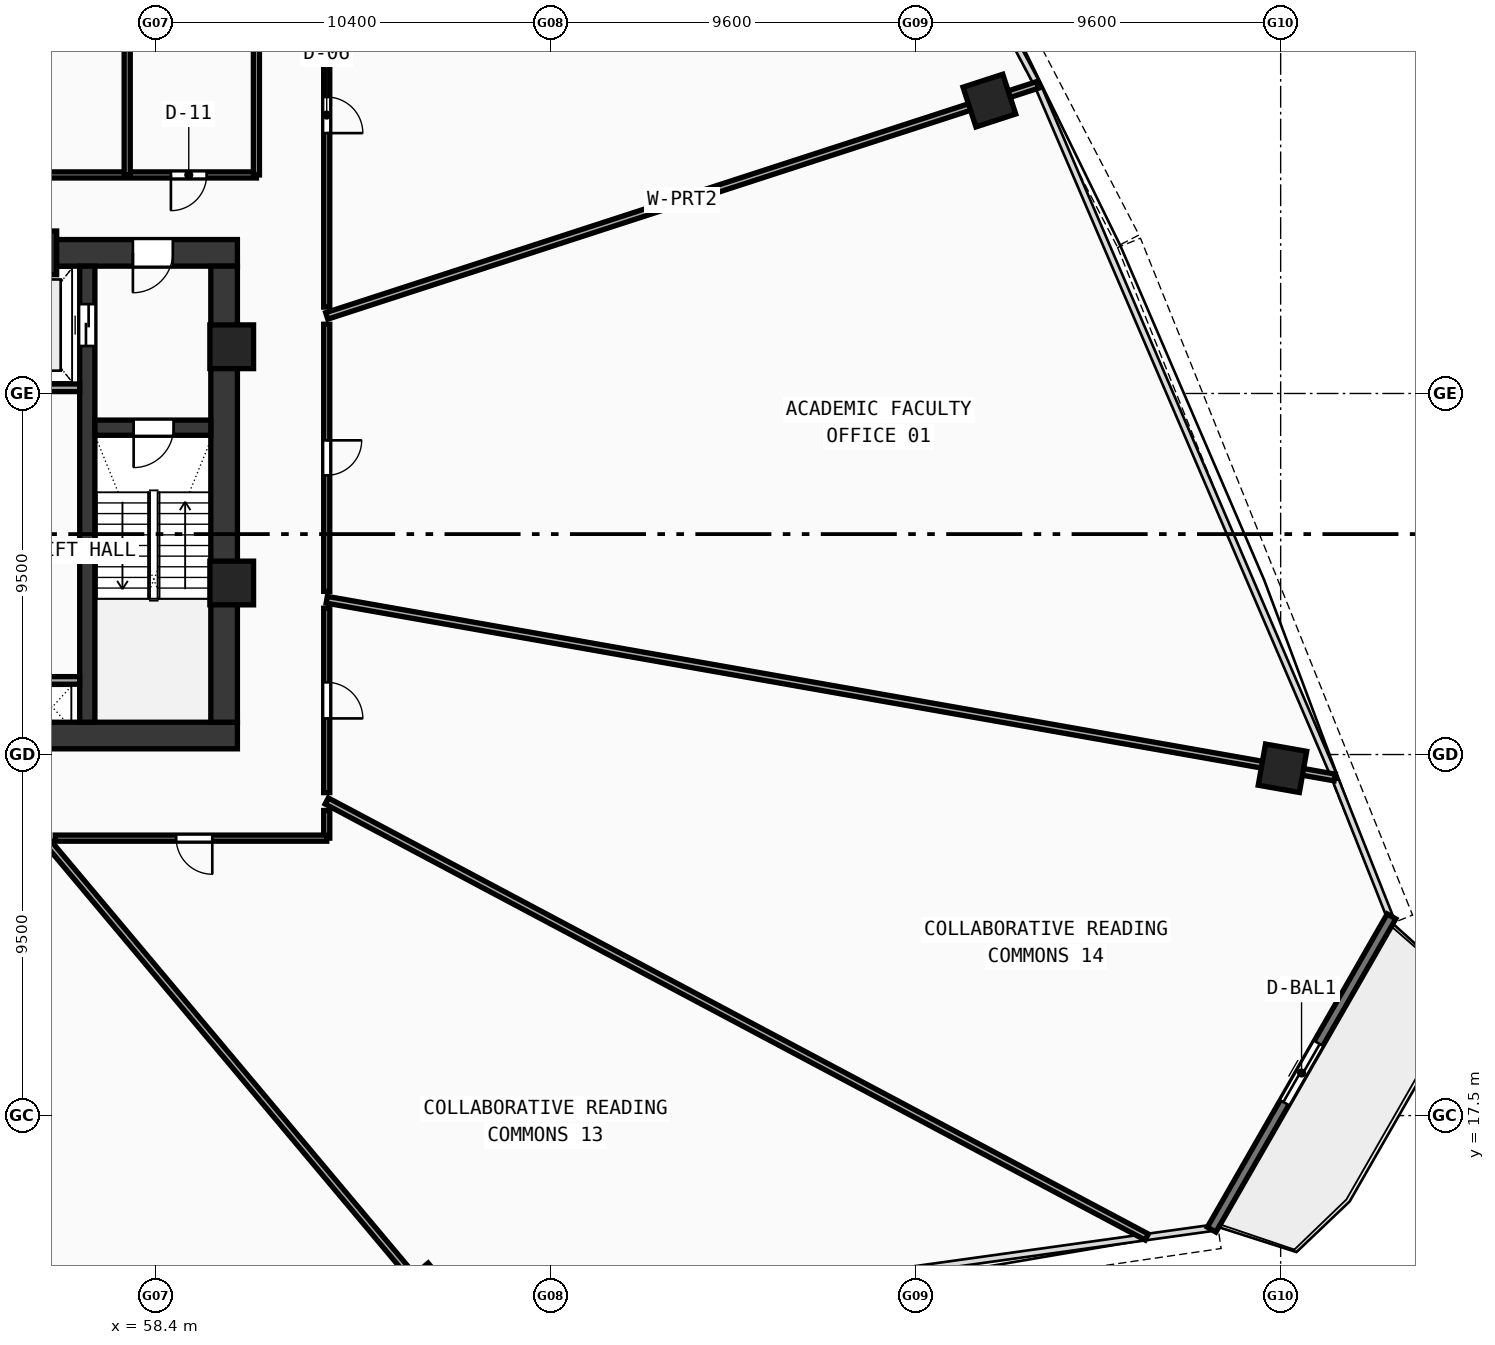
"""IFC4 building model, lengths in metres.
Left out: names, types, materials, properties, quantities, classifications, styles, units other than length and angle.
Written with IfcOpenShell. Run it as: python <this file> out.ifc"""

import sys

from ifc_helpers import new_model, si_unit, direction, frame, frame_2d, origin, origin_with_axes, origin_2d, place, context, subcontext, project, spatial, rectangle, hollow_rectangle, extrude, source, transform, mapped, element, fill, save


model = new_model("IFC4")
c1 = context("Model", 3, precision=1e-05, world=origin(), true_north=direction((0.0, 1.0)))
c2 = subcontext(c1, "Body", "Model", "MODEL_VIEW")
j1 = project(units=[si_unit("LENGTHUNIT", "METRE"), si_unit("PLANEANGLEUNIT", "RADIAN")], contexts=[c1])
p1 = place(None, origin())
s1 = spatial("IfcSite", under=j1, at=p1, CompositionType="ELEMENT")
p2 = place(p1, origin())
s2 = spatial("IfcBuilding", under=s1, at=p2, CompositionType="ELEMENT")
p3 = place(p2, frame((0.0, 0.0, 55.81)))
s3 = spatial("IfcBuildingStorey", under=s2, at=p3, CompositionType="ELEMENT", Elevation=55.81)
p4 = place(p3, frame((35.45, 27.5, 0.0), z_axis=(0.0, 0.0, 1.0), x_axis=(1.0, 0.0, 0.0)))
e1 = element("IfcWall", 1, at=p4, inside=s3, PredefinedType="SHEAR", context=c2, shape_type="SweptSolid", body=[
    extrude(rectangle(XDim=25.1, YDim=0.7, at=frame_2d((12.55, 0.0))), origin(), (0.0, 0.0, 1.0), 3.37),
])
p5 = place(p3, frame((49.2, 40.2, 0.0), z_axis=(0.0, 0.0, 1.0), x_axis=(1.0, 0.0, 0.0)))
e2 = element("IfcWall", 2, at=p5, inside=s3, PredefinedType="SHEAR", context=c2, shape_type="SweptSolid", body=[
    extrude(rectangle(XDim=11.35, YDim=0.7, at=frame_2d((5.675, 0.0))), origin(), (0.0, 0.0, 1.0), 3.37),
])
p6 = place(p5, frame((8.6, 0.0, 0.0)))
e3 = element("IfcOpeningElement", 3, at=p6, cuts=e2, PredefinedType="OPENING", context=c2, shape_type="SweptSolid", body=[
    extrude(rectangle(XDim=1.05, YDim=2.1, at=frame_2d((0.525, 1.05))), frame((0.0, 0.36, 0.0), z_axis=(0.0, -1.0, 0.0), x_axis=(1.0, 0.0, 0.0)), (0.0, 0.0, 1.0), 0.72),
])
p7 = place(p3, frame((60.2, 27.85, 0.0), z_axis=(0.0, 0.0, 1.0), x_axis=(0.0, 1.0, 0.0)))
e4 = element("IfcWall", 4, at=p7, inside=s3, PredefinedType="SHEAR", context=c2, shape_type="SweptSolid", body=[
    extrude(rectangle(XDim=12.0, YDim=0.7, at=frame_2d((6.0, 0.0))), origin(), (0.0, 0.0, 1.0), 3.37),
])
p8 = place(p3, frame((56.6, 27.85, 0.0), z_axis=(0.0, 0.0, 1.0), x_axis=(0.0, 1.0, 0.0)))
e5 = element("IfcWall", 5, at=p8, inside=s3, PredefinedType="SHEAR", context=c2, shape_type="SweptSolid", body=[
    extrude(rectangle(XDim=12.0, YDim=0.4, at=frame_2d((6.0, 0.0))), origin(), (0.0, 0.0, 1.0), 3.37),
])
p9 = place(p8, frame((9.9, 0.0, 0.0)))
e6 = element("IfcOpeningElement", 6, at=p9, cuts=e5, PredefinedType="OPENING", context=c2, shape_type="SweptSolid", body=[
    extrude(rectangle(XDim=1.1, YDim=2.1, at=frame_2d((0.55, 1.05))), frame((0.0, 0.21, 0.0), z_axis=(0.0, -1.0, 0.0), x_axis=(1.0, 0.0, 0.0)), (0.0, 0.0, 1.0), 0.42),
])
p10 = place(p3, frame((56.8, 35.6, 0.0), z_axis=(0.0, 0.0, 1.0), x_axis=(1.0, 0.0, 0.0)))
e7 = element("IfcWall", 7, at=p10, inside=s3, PredefinedType="SHEAR", context=c2, shape_type="SweptSolid", body=[
    extrude(rectangle(XDim=3.05, YDim=0.4, at=frame_2d((1.525, 0.0))), origin(), (0.0, 0.0, 1.0), 3.37),
])
p11 = place(p10, frame((1.02, 0.0, 0.0)))
e8 = element("IfcOpeningElement", 8, at=p11, cuts=e7, PredefinedType="OPENING", context=c2, shape_type="SweptSolid", body=[
    extrude(rectangle(XDim=1.05, YDim=2.1, at=frame_2d((0.525, 1.05))), frame((0.0, 0.21, 0.0), z_axis=(0.0, -1.0, 0.0), x_axis=(1.0, 0.0, 0.0)), (0.0, 0.0, 1.0), 0.42),
])
m1 = source(origin(), c2, "Body", "SweptSolid", [
    extrude(hollow_rectangle(XDim=1.15, YDim=1.15, WallThickness=0.048, at=origin_2d()), origin(), (0.0, 0.0, 1.0), 3.63),
])
for number, where, z_axis, x_axis in (
    (9, (60.4, 31.513, -0.26), (0.0, 0.0, 1.0), (1.0, 0.0, 0.0)),
    (10, (60.4, 37.729, -0.26), (0.0, 0.0, 1.0), (1.0, 0.0, 0.0)),
    (11, (55.219, 40.2, -0.26), (0.0, 0.0, 1.0), (1.0, 0.0, 0.0)),
):
    element("IfcColumn", number, at=place(p3, frame(where, z_axis=z_axis, x_axis=x_axis)), inside=s3, PredefinedType="COLUMN", context=c2, shape_type="MappedRepresentation", body=[
        mapped(m1, transform((0.0, 0.0, 0.0), scale=1.0)),
    ])
m2 = source(origin(), c2, "Body", "SweptSolid", [
    extrude(hollow_rectangle(XDim=1.1, YDim=1.1, WallThickness=0.045, at=origin_2d()), origin(), (0.0, 0.0, 1.0), 3.63),
])
for number, where, z_axis, x_axis in (
    (12, (65.5, 12.844, -0.26), (0.0, 0.0, 1.0), (0.766, 0.643, 0.0)),
    (13, (88.048, 26.638, -0.26), (0.0, 0.0, 1.0), (0.174, 0.985, 0.0)),
    (14, (80.335, 44.206, -0.26), (0.0, 0.0, 1.0), (-0.309, 0.951, 0.0)),
):
    element("IfcColumn", number, at=place(p3, frame(where, z_axis=z_axis, x_axis=x_axis)), inside=s3, PredefinedType="COLUMN", context=c2, shape_type="MappedRepresentation", body=[
        mapped(m2, transform((0.0, 0.0, 0.0), scale=1.0)),
    ])
p12 = place(p3, frame((86.184, 14.499, 0.0), z_axis=(0.0, 0.0, 1.0), x_axis=(0.497919395469, 0.86722331358, 0.0)))
e15 = element("IfcWall", 15, at=p12, inside=s3, PredefinedType="STANDARD", context=c2, shape_type="SweptSolid", body=[
    extrude(rectangle(XDim=9.504, YDim=0.26, at=frame_2d((4.752, 0.0))), origin(), (0.0, 0.0, 1.0), 3.37),
])
p13 = place(p12, frame((3.852, 0.0, 0.0)))
e16 = element("IfcOpeningElement", 16, at=p13, cuts=e15, PredefinedType="OPENING", context=c2, shape_type="SweptSolid", body=[
    extrude(rectangle(XDim=1.8, YDim=2.15, at=frame_2d((0.9, 1.075))), frame((0.0, 0.14, 0.0), z_axis=(0.0, -1.0, 0.0), x_axis=(1.0, 0.0, 0.0)), (0.0, 0.0, 1.0), 0.28),
])
p14 = place(p3, frame((53.68, 36.65, 0.0), z_axis=(0.0, 0.0, 1.0), x_axis=(1.0, 0.0, 0.0)))
e17 = element("IfcWall", 17, at=p14, inside=s3, PredefinedType="SOLIDWALL", context=c2, shape_type="SweptSolid", body=[
    extrude(rectangle(XDim=2.72, YDim=0.2, at=frame_2d((1.36, 0.0))), origin(), (0.0, 0.0, 1.0), 3.37),
])
p15 = place(p3, frame((55.12, 28.95, 0.0), z_axis=(0.0, 0.0, 1.0), x_axis=(1.0, 0.0, 0.0)))
e18 = element("IfcWall", 18, at=p15, inside=s3, PredefinedType="SOLIDWALL", context=c2, shape_type="SweptSolid", body=[
    extrude(rectangle(XDim=1.28, YDim=0.2, at=frame_2d((0.64, 0.0))), origin(), (0.0, 0.0, 1.0), 3.37),
])
p16 = place(p3, frame((45.92, 42.25, 0.0), z_axis=(0.0, 0.0, 1.0), x_axis=(1.0, 0.0, 0.0)))
e19 = element("IfcWall", 19, at=p16, inside=s3, PredefinedType="PARTITIONING", context=c2, shape_type="SweptSolid", body=[
    extrude(rectangle(XDim=15.13, YDim=0.16, at=frame_2d((7.565, 0.0))), origin(), (0.0, 0.0, 1.0), 2.67),
])
p17 = place(p16, frame((2.1, 0.0, 0.0)))
e20 = element("IfcOpeningElement", 20, at=p17, cuts=e19, PredefinedType="OPENING", context=c2, shape_type="SweptSolid", body=[
    extrude(rectangle(XDim=0.92, YDim=2.1, at=frame_2d((0.46, 1.05))), frame((0.0, 0.09, 0.0), z_axis=(0.0, -1.0, 0.0), x_axis=(1.0, 0.0, 0.0)), (0.0, 0.0, 1.0), 0.18),
])
p18 = place(p16, frame((12.88, 0.0, 0.0)))
e21 = element("IfcOpeningElement", 21, at=p18, cuts=e19, PredefinedType="OPENING", context=c2, shape_type="SweptSolid", body=[
    extrude(rectangle(XDim=0.94, YDim=2.1, at=frame_2d((0.47, 1.05))), frame((0.0, 0.09, 0.0), z_axis=(0.0, -1.0, 0.0), x_axis=(1.0, 0.0, 0.0)), (0.0, 0.0, 1.0), 0.18),
])
p19 = place(p3, frame((61.05, 42.25, 0.0), z_axis=(0.0, 0.0, 1.0), x_axis=(0.0, 1.0, 0.0)))
e22 = element("IfcWall", 22, at=p19, inside=s3, PredefinedType="PARTITIONING", context=c2, shape_type="SweptSolid", body=[
    extrude(rectangle(XDim=4.55, YDim=0.16, at=frame_2d((2.275, 0.0))), origin(), (0.0, 0.0, 1.0), 2.67),
])
p20 = place(p3, frame((57.65, 42.25, 0.0), z_axis=(0.0, 0.0, 1.0), x_axis=(0.0, 1.0, 0.0)))
e23 = element("IfcWall", 23, at=p20, inside=s3, PredefinedType="PARTITIONING", context=c2, shape_type="SweptSolid", body=[
    extrude(rectangle(XDim=4.35, YDim=0.16, at=frame_2d((2.175, 0.0))), origin(), (0.0, 0.0, 1.0), 2.67),
])
p21 = place(p3, frame((62.9, 38.541, 0.0), z_axis=(0.0, 0.0, 1.0), x_axis=(0.951053317048, 0.309026840471, 0.0)))
e24 = element("IfcWall", 24, at=p21, inside=s3, PredefinedType="PARTITIONING", context=c2, shape_type="SweptSolid", body=[
    extrude(rectangle(XDim=19.666, YDim=0.18, at=frame_2d((9.833, 0.0))), origin(), (0.0, 0.0, 1.0), 2.67),
])
p22 = place(p3, frame((55.468, 24.8, 0.0), z_axis=(0.0, 0.0, 1.0), x_axis=(0.642791593325, -0.766041100432, 0.0)))
e25 = element("IfcWall", 25, at=p22, inside=s3, PredefinedType="PARTITIONING", context=c2, shape_type="SweptSolid", body=[
    extrude(rectangle(XDim=16.988, YDim=0.18, at=frame_2d((8.494, 0.0))), origin(), (0.0, 0.0, 1.0), 2.67),
])
p23 = place(p3, frame((62.9, 25.778, 0.0), z_axis=(0.0, 0.0, 1.0), x_axis=(0.882949316257, -0.469468321531, 0.0)))
e26 = element("IfcWall", 26, at=p23, inside=s3, PredefinedType="PARTITIONING", context=c2, shape_type="SweptSolid", body=[
    extrude(rectangle(XDim=24.437, YDim=0.18, at=frame_2d((12.219, 0.0))), origin(), (0.0, 0.0, 1.0), 2.67),
])
p24 = place(p3, frame((62.9, 31.073, 0.0), z_axis=(0.0, 0.0, 1.0), x_axis=(0.984808099647, -0.173646211791, 0.0)))
e27 = element("IfcWall", 27, at=p24, inside=s3, PredefinedType="PARTITIONING", context=c2, shape_type="SweptSolid", body=[
    extrude(rectangle(XDim=26.93, YDim=0.18, at=frame_2d((13.465, 0.0))), origin(), (0.0, 0.0, 1.0), 2.67),
])
p25 = place(p3, frame((62.9, 48.65, 0.0), z_axis=(0.0, 0.0, 1.0), x_axis=(0.0, -1.0, 0.0)))
e28 = element("IfcWall", 28, at=p25, inside=s3, PredefinedType="PARTITIONING", context=c2, shape_type="SweptSolid", body=[
    extrude(rectangle(XDim=9.877, YDim=0.16, at=frame_2d((4.938, 0.0))), origin(), (0.0, 0.0, 1.0), 2.67),
])
p26 = place(p25, frame((4.349, 0.0, 0.0)))
e29 = element("IfcOpeningElement", 29, at=p26, cuts=e28, PredefinedType="OPENING", context=c2, shape_type="SweptSolid", body=[
    extrude(rectangle(XDim=0.95, YDim=2.1, at=frame_2d((0.475, 1.05))), frame((0.0, 0.09, 0.0), z_axis=(0.0, -1.0, 0.0), x_axis=(1.0, 0.0, 0.0)), (0.0, 0.0, 1.0), 0.18),
])
p27 = place(p3, frame((62.9, 38.322, 0.0), z_axis=(0.0, 0.0, 1.0), x_axis=(0.0, -1.0, 0.0)))
e30 = element("IfcWall", 30, at=p27, inside=s3, PredefinedType="PARTITIONING", context=c2, shape_type="SweptSolid", body=[
    extrude(rectangle(XDim=7.029, YDim=0.16, at=frame_2d((3.515, 0.0))), origin(), (0.0, 0.0, 1.0), 3.37),
])
p28 = place(p27, frame((3.054, 0.0, 0.0)))
e31 = element("IfcOpeningElement", 31, at=p28, cuts=e30, PredefinedType="OPENING", context=c2, shape_type="SweptSolid", body=[
    extrude(rectangle(XDim=0.92, YDim=2.1, at=frame_2d((0.46, 1.05))), frame((0.0, 0.09, 0.0), z_axis=(0.0, -1.0, 0.0), x_axis=(1.0, 0.0, 0.0)), (0.0, 0.0, 1.0), 0.18),
])
p29 = place(p3, frame((62.9, 30.849, 0.0), z_axis=(0.0, 0.0, 1.0), x_axis=(0.0, -1.0, 0.0)))
e32 = element("IfcWall", 32, at=p29, inside=s3, PredefinedType="PARTITIONING", context=c2, shape_type="SweptSolid", body=[
    extrude(rectangle(XDim=4.852, YDim=0.16, at=frame_2d((2.426, 0.0))), origin(), (0.0, 0.0, 1.0), 3.37),
])
p30 = place(p29, frame((1.949, 0.0, 0.0)))
e33 = element("IfcOpeningElement", 33, at=p30, cuts=e32, PredefinedType="OPENING", context=c2, shape_type="SweptSolid", body=[
    extrude(rectangle(XDim=0.95, YDim=2.1, at=frame_2d((0.475, 1.05))), frame((0.0, 0.09, 0.0), z_axis=(0.0, -1.0, 0.0), x_axis=(1.0, 0.0, 0.0)), (0.0, 0.0, 1.0), 0.18),
])
p31 = place(p3, frame((62.9, 25.528, 0.0), z_axis=(0.0, 0.0, 1.0), x_axis=(0.0, -1.0, 0.0)))
e34 = element("IfcWall", 34, at=p31, inside=s3, PredefinedType="PARTITIONING", context=c2, shape_type="SweptSolid", body=[
    extrude(rectangle(XDim=0.728, YDim=0.16, at=frame_2d((0.364, 0.0))), origin(), (0.0, 0.0, 1.0), 2.97),
])
p32 = place(p3, frame((62.9, 24.8, 0.0), z_axis=(0.0, 0.0, 1.0), x_axis=(-1.0, 0.0, 0.0)))
e35 = element("IfcWall", 35, at=p32, inside=s3, PredefinedType="PARTITIONING", context=c2, shape_type="SweptSolid", body=[
    extrude(rectangle(XDim=7.145, YDim=0.16, at=frame_2d((3.572, 0.0))), origin(), (0.0, 0.0, 1.0), 2.97),
])
p33 = place(p32, frame((3.011, 0.0, 0.0)))
e36 = element("IfcOpeningElement", 36, at=p33, cuts=e35, PredefinedType="OPENING", context=c2, shape_type="SweptSolid", body=[
    extrude(rectangle(XDim=0.95, YDim=2.1, at=frame_2d((0.475, 1.05))), frame((0.0, 0.09, 0.0), z_axis=(0.0, -1.0, 0.0), x_axis=(1.0, 0.0, 0.0)), (0.0, 0.0, 1.0), 0.18),
])
m3 = source(origin(), c2, "Body", "SweptSolid", [
    extrude(rectangle(XDim=1.8, YDim=2.15, at=frame_2d((0.9, 1.075))), frame((0.0, 0.025, 0.0), z_axis=(0.0, -1.0, 0.0), x_axis=(1.0, 0.0, 0.0)), (0.0, 0.0, 1.0), 0.05),
])
p34 = place(p13, origin_with_axes())
e37 = element("IfcDoor", 37, at=p34, inside=s3, OperationType="DOUBLE_DOOR_SLIDING", PredefinedType="DOOR", context=c2, shape_type="MappedRepresentation", body=[
    mapped(m3, transform((0.0, 0.0, 0.0), scale=1.0)),
])
fill(e16, e37)
m4 = source(origin(), c2, "Body", "SweptSolid", [
    extrude(rectangle(XDim=1.05, YDim=2.1, at=frame_2d((0.525, 1.05))), frame((0.0, 0.025, 0.0), z_axis=(0.0, -1.0, 0.0), x_axis=(1.0, 0.0, 0.0)), (0.0, 0.0, 1.0), 0.05),
])
p35 = place(p11, frame((1.05, 0.0, 0.0), z_axis=(0.0, 0.0, 1.0), x_axis=(-1.0, 0.0, 0.0)))
e38 = element("IfcDoor", 38, at=p35, inside=s3, OperationType="SINGLE_SWING_RIGHT", PredefinedType="DOOR", context=c2, shape_type="MappedRepresentation", body=[
    mapped(m4, transform((0.0, 0.0, 0.0), scale=1.0)),
])
fill(e8, e38)
p36 = place(p6, frame((1.05, 0.0, 0.0), z_axis=(0.0, 0.0, 1.0), x_axis=(-1.0, 0.0, 0.0)))
e39 = element("IfcDoor", 39, at=p36, inside=s3, OperationType="SINGLE_SWING_RIGHT", PredefinedType="DOOR", context=c2, shape_type="MappedRepresentation", body=[
    mapped(m4, transform((0.0, 0.0, 0.0), scale=1.0)),
])
fill(e3, e39)
m5 = source(origin(), c2, "Body", "SweptSolid", [
    extrude(rectangle(XDim=1.1, YDim=2.1, at=frame_2d((0.55, 1.05))), frame((0.0, 0.025, 0.0), z_axis=(0.0, -1.0, 0.0), x_axis=(1.0, 0.0, 0.0)), (0.0, 0.0, 1.0), 0.05),
])
p37 = place(p9, origin_with_axes())
e40 = element("IfcDoor", 40, at=p37, inside=s3, OperationType="DOUBLE_DOOR_SLIDING", PredefinedType="DOOR", context=c2, shape_type="MappedRepresentation", body=[
    mapped(m5, transform((0.0, 0.0, 0.0), scale=1.0)),
])
fill(e6, e40)
m6 = source(origin(), c2, "Body", "SweptSolid", [
    extrude(rectangle(XDim=0.94, YDim=2.1, at=frame_2d((0.47, 1.05))), frame((0.0, 0.025, 0.0), z_axis=(0.0, -1.0, 0.0), x_axis=(1.0, 0.0, 0.0)), (0.0, 0.0, 1.0), 0.05),
])
p38 = place(p18, frame((0.94, 0.0, 0.0), z_axis=(0.0, 0.0, 1.0), x_axis=(-1.0, 0.0, 0.0)))
e41 = element("IfcDoor", 41, at=p38, inside=s3, OperationType="SINGLE_SWING_RIGHT", PredefinedType="DOOR", context=c2, shape_type="MappedRepresentation", body=[
    mapped(m6, transform((0.0, 0.0, 0.0), scale=1.0)),
])
fill(e21, e41)
m7 = source(origin(), c2, "Body", "SweptSolid", [
    extrude(rectangle(XDim=0.92, YDim=2.1, at=frame_2d((0.46, 1.05))), frame((0.0, 0.025, 0.0), z_axis=(0.0, -1.0, 0.0), x_axis=(1.0, 0.0, 0.0)), (0.0, 0.0, 1.0), 0.05),
])
p39 = place(p28, origin_with_axes())
e42 = element("IfcDoor", 42, at=p39, inside=s3, OperationType="SINGLE_SWING_LEFT", PredefinedType="DOOR", context=c2, shape_type="MappedRepresentation", body=[
    mapped(m7, transform((0.0, 0.0, 0.0), scale=1.0)),
])
fill(e31, e42)
m8 = source(origin(), c2, "Body", "SweptSolid", [
    extrude(rectangle(XDim=0.95, YDim=2.1, at=frame_2d((0.475, 1.05))), frame((0.0, 0.025, 0.0), z_axis=(0.0, -1.0, 0.0), x_axis=(1.0, 0.0, 0.0)), (0.0, 0.0, 1.0), 0.05),
])
p40 = place(p26, origin_with_axes())
e43 = element("IfcDoor", 43, at=p40, inside=s3, OperationType="SINGLE_SWING_RIGHT", PredefinedType="DOOR", context=c2, shape_type="MappedRepresentation", body=[
    mapped(m8, transform((0.0, 0.0, 0.0), scale=1.0)),
])
fill(e29, e43)
p41 = place(p33, origin_with_axes())
e44 = element("IfcDoor", 44, at=p41, inside=s3, OperationType="SINGLE_SWING_LEFT", PredefinedType="DOOR", context=c2, shape_type="MappedRepresentation", body=[
    mapped(m8, transform((0.0, 0.0, 0.0), scale=1.0)),
])
fill(e36, e44)
p42 = place(p30, origin_with_axes())
e45 = element("IfcDoor", 45, at=p42, inside=s3, OperationType="SINGLE_SWING_RIGHT", PredefinedType="DOOR", context=c2, shape_type="MappedRepresentation", body=[
    mapped(m8, transform((0.0, 0.0, 0.0), scale=1.0)),
])
fill(e33, e45)
save(model, sys.argv[1])
